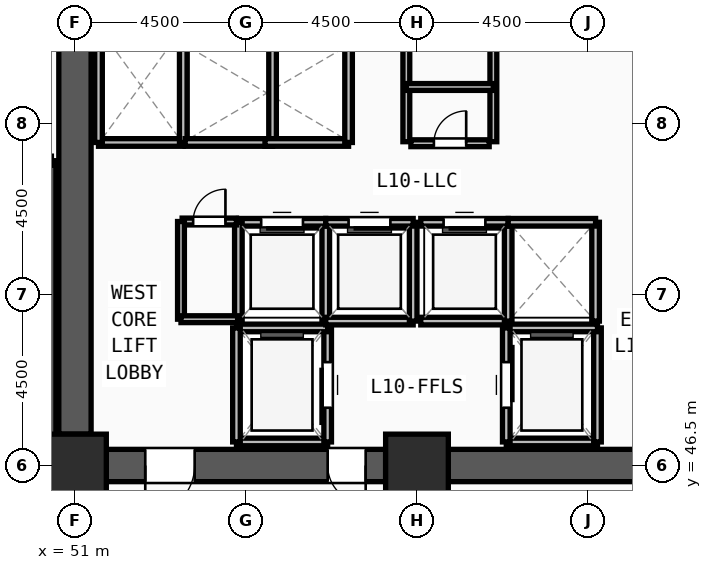
"""IFC4 building model, lengths in metres.
Left out: names, types, materials, properties, quantities, classifications, styles, units other than length and angle.
Written with IfcOpenShell. Run it as: python <this file> out.ifc"""

import sys

from ifc_helpers import new_model, si_unit, direction, frame, frame_2d, origin, origin_2d, place, context, subcontext, project, spatial, rectangle, extrude, source, transform, mapped, element, fill, save


model = new_model("IFC4")
c1 = context("Model", 3, precision=1e-05, world=origin(), true_north=direction((0.0, 1.0)))
c2 = subcontext(c1, "Body", "Model", "MODEL_VIEW")
j1 = project(units=[si_unit("LENGTHUNIT", "METRE"), si_unit("PLANEANGLEUNIT", "RADIAN")], contexts=[c1])
p1 = place(None, origin())
s1 = spatial("IfcSite", under=j1, at=p1, CompositionType="ELEMENT")
p2 = place(p1, origin())
s2 = spatial("IfcBuilding", under=s1, at=p2, CompositionType="ELEMENT")
p3 = place(p2, frame((0.0, 0.0, 39.75)))
s3 = spatial("IfcBuildingStorey", under=s2, at=p3, CompositionType="ELEMENT", Elevation=39.75)
m1 = source(origin(), c2, "Body", "SweptSolid", [
    extrude(rectangle(XDim=1.65, YDim=1.65, at=origin_2d()), origin(), (0.0, 0.0, 1.0), 3.75),
])
for number, where, z_axis, x_axis in (
    (1, (51.0, 46.5, 0.0), (0.0, 0.0, 1.0), (1.0, 0.0, 0.0)),
    (2, (60.0, 46.5, 0.0), (0.0, 0.0, 1.0), (1.0, 0.0, 0.0)),
):
    element("IfcColumn", number, at=place(p3, frame(where, z_axis=z_axis, x_axis=x_axis)), inside=s3, PredefinedType="COLUMN", context=c2, shape_type="MappedRepresentation", body=[
        mapped(m1, transform((0.0, 0.0, 0.0), x_axis=(1.0, 0.0, 0.0), y_axis=(0.0, 1.0, 0.0), z_axis=(0.0, 0.0, 1.0), scale=1.0)),
    ])
p4 = place(p3, frame((68.175, 46.5, 0.0), z_axis=(0.0, 0.0, 1.0), x_axis=(-1.0, 0.0, 0.0)))
e3 = element("IfcWall", 3, at=p4, inside=s3, PredefinedType="SHEAR", context=c2, shape_type="SweptSolid", body=[
    extrude(rectangle(XDim=7.35, YDim=0.85, at=frame_2d((3.675, 0.0))), origin(), (0.0, 0.0, 1.0), 3.57),
])
m2 = source(origin(), c2, "Body", "SweptSolid", [
    extrude(rectangle(XDim=1.3, YDim=2.2, at=frame_2d((0.65, 1.1))), frame((0.0, 0.435, 0.0), z_axis=(0.0, -1.0, 0.0), x_axis=(1.0, 0.0, 0.0)), (0.0, 0.0, 1.0), 0.87),
])
p5 = place(p4, frame((1.025, 0.0, 0.0)))
e4 = element("IfcOpeningElement", 4, at=p5, cuts=e3, PredefinedType="OPENING", context=c2, shape_type="MappedRepresentation", body=[
    mapped(m2, transform((0.0, 0.0, 0.0), x_axis=(1.0, 0.0, 0.0), y_axis=(0.0, 1.0, 0.0), z_axis=(0.0, 0.0, 1.0), scale=1.0)),
])
p6 = place(p3, frame((59.175, 46.5, 0.0), z_axis=(0.0, 0.0, 1.0), x_axis=(-1.0, 0.0, 0.0)))
e5 = element("IfcWall", 5, at=p6, inside=s3, PredefinedType="SHEAR", context=c2, shape_type="SweptSolid", body=[
    extrude(rectangle(XDim=7.35, YDim=0.85, at=frame_2d((3.675, 0.0))), origin(), (0.0, 0.0, 1.0), 3.57),
])
p7 = place(p6, frame((5.025, 0.0, 0.0)))
e6 = element("IfcOpeningElement", 6, at=p7, cuts=e5, PredefinedType="OPENING", context=c2, shape_type="MappedRepresentation", body=[
    mapped(m2, transform((0.0, 0.0, 0.0), x_axis=(1.0, 0.0, 0.0), y_axis=(0.0, 1.0, 0.0), z_axis=(0.0, 0.0, 1.0), scale=1.0)),
])
m3 = source(origin(), c2, "Body", "SweptSolid", [
    extrude(rectangle(XDim=1.0, YDim=2.2, at=frame_2d((0.5, 1.1))), frame((0.0, 0.435, 0.0), z_axis=(0.0, -1.0, 0.0), x_axis=(1.0, 0.0, 0.0)), (0.0, 0.0, 1.0), 0.87),
])
p8 = place(p6, frame((0.525, 0.0, 0.0)))
e7 = element("IfcOpeningElement", 7, at=p8, cuts=e5, PredefinedType="OPENING", context=c2, shape_type="MappedRepresentation", body=[
    mapped(m3, transform((0.0, 0.0, 0.0), x_axis=(1.0, 0.0, 0.0), y_axis=(0.0, 1.0, 0.0), z_axis=(0.0, 0.0, 1.0), scale=1.0)),
])
p9 = place(p3, frame((51.0, 47.325, 0.0), z_axis=(0.0, 0.0, 1.0), x_axis=(0.0, 1.0, 0.0)))
e8 = element("IfcWall", 8, at=p9, inside=s3, PredefinedType="SHEAR", context=c2, shape_type="SweptSolid", body=[
    extrude(rectangle(XDim=13.35, YDim=0.85, at=frame_2d((6.675, 0.0))), origin(), (0.0, 0.0, 1.0), 3.57),
])
p10 = place(p3, frame((50.38, 46.7, 0.0), z_axis=(0.0, 0.0, 1.0), x_axis=(0.0, 1.0, 0.0)))
e9 = element("IfcWall", 9, at=p10, inside=s3, PredefinedType="SOLIDWALL", context=c2, shape_type="SweptSolid", body=[
    extrude(rectangle(XDim=7.82, YDim=0.24, at=frame_2d((3.91, 0.0))), origin(), (0.0, 0.0, 1.0), 3.57),
])
p11 = place(p3, frame((55.25, 47.12, 0.0), z_axis=(0.0, 0.0, 1.0), x_axis=(1.0, 0.0, 0.0)))
e10 = element("IfcWall", 10, at=p11, inside=s3, PredefinedType="SOLIDWALL", context=c2, shape_type="SweptSolid", body=[
    extrude(rectangle(XDim=2.4, YDim=0.2, at=frame_2d((1.2, 0.0))), origin(), (0.0, 0.0, 1.0), 3.57),
])
p12 = place(p3, frame((57.65, 47.12, 0.0), z_axis=(0.0, 0.0, 1.0), x_axis=(0.0, 1.0, 0.0)))
e11 = element("IfcWall", 11, at=p12, inside=s3, PredefinedType="SOLIDWALL", context=c2, shape_type="SweptSolid", body=[
    extrude(rectangle(XDim=3.0, YDim=0.2, at=frame_2d((1.5, 0.0))), origin(), (0.0, 0.0, 1.0), 3.57),
])
m4 = source(origin(), c2, "Body", "SweptSolid", [
    extrude(rectangle(XDim=1.2, YDim=2.3, at=frame_2d((0.6, 1.15))), frame((0.0, 0.11, 0.0), z_axis=(0.0, -1.0, 0.0), x_axis=(1.0, 0.0, 0.0)), (0.0, 0.0, 1.0), 0.22),
])
p13 = place(p12, frame((0.9, 0.0, 0.0)))
e12 = element("IfcOpeningElement", 12, at=p13, cuts=e11, PredefinedType="OPENING", context=c2, shape_type="MappedRepresentation", body=[
    mapped(m4, transform((0.0, 0.0, 0.0), x_axis=(1.0, 0.0, 0.0), y_axis=(0.0, 1.0, 0.0), z_axis=(0.0, 0.0, 1.0), scale=1.0)),
])
p14 = place(p3, frame((57.65, 50.12, 0.0), z_axis=(0.0, 0.0, 1.0), x_axis=(-1.0, 0.0, 0.0)))
e13 = element("IfcWall", 13, at=p14, inside=s3, PredefinedType="SOLIDWALL", context=c2, shape_type="SweptSolid", body=[
    extrude(rectangle(XDim=2.4, YDim=0.2, at=frame_2d((1.2, 0.0))), origin(), (0.0, 0.0, 1.0), 3.57),
])
p15 = place(p3, frame((55.25, 50.12, 0.0), z_axis=(0.0, 0.0, 1.0), x_axis=(0.0, -1.0, 0.0)))
e14 = element("IfcWall", 14, at=p15, inside=s3, PredefinedType="SOLIDWALL", context=c2, shape_type="SweptSolid", body=[
    extrude(rectangle(XDim=3.0, YDim=0.2, at=frame_2d((1.5, 0.0))), origin(), (0.0, 0.0, 1.0), 3.57),
])
p16 = place(p3, frame((62.35, 47.12, 0.0), z_axis=(0.0, 0.0, 1.0), x_axis=(1.0, 0.0, 0.0)))
e15 = element("IfcWall", 15, at=p16, inside=s3, PredefinedType="SOLIDWALL", context=c2, shape_type="SweptSolid", body=[
    extrude(rectangle(XDim=2.4, YDim=0.2, at=frame_2d((1.2, 0.0))), origin(), (0.0, 0.0, 1.0), 3.57),
])
p17 = place(p3, frame((64.75, 47.12, 0.0), z_axis=(0.0, 0.0, 1.0), x_axis=(0.0, 1.0, 0.0)))
e16 = element("IfcWall", 16, at=p17, inside=s3, PredefinedType="SOLIDWALL", context=c2, shape_type="SweptSolid", body=[
    extrude(rectangle(XDim=3.0, YDim=0.2, at=frame_2d((1.5, 0.0))), origin(), (0.0, 0.0, 1.0), 3.57),
])
p18 = place(p3, frame((64.75, 50.12, 0.0), z_axis=(0.0, 0.0, 1.0), x_axis=(-1.0, 0.0, 0.0)))
e17 = element("IfcWall", 17, at=p18, inside=s3, PredefinedType="SOLIDWALL", context=c2, shape_type="SweptSolid", body=[
    extrude(rectangle(XDim=2.4, YDim=0.2, at=frame_2d((1.2, 0.0))), origin(), (0.0, 0.0, 1.0), 3.57),
])
p19 = place(p3, frame((62.35, 50.12, 0.0), z_axis=(0.0, 0.0, 1.0), x_axis=(0.0, -1.0, 0.0)))
e18 = element("IfcWall", 18, at=p19, inside=s3, PredefinedType="SOLIDWALL", context=c2, shape_type="SweptSolid", body=[
    extrude(rectangle(XDim=3.0, YDim=0.2, at=frame_2d((1.5, 0.0))), origin(), (0.0, 0.0, 1.0), 3.57),
])
p20 = place(p19, frame((0.9, 0.0, 0.0)))
e19 = element("IfcOpeningElement", 19, at=p20, cuts=e18, PredefinedType="OPENING", context=c2, shape_type="MappedRepresentation", body=[
    mapped(m4, transform((0.0, 0.0, 0.0), x_axis=(1.0, 0.0, 0.0), y_axis=(0.0, 1.0, 0.0), z_axis=(0.0, 0.0, 1.0), scale=1.0)),
])
p21 = place(p3, frame((51.62, 55.0, 0.0), z_axis=(0.0, 0.0, 1.0), x_axis=(1.0, 0.0, 0.0)))
e20 = element("IfcWall", 20, at=p21, inside=s3, PredefinedType="SOLIDWALL", context=c2, shape_type="SweptSolid", body=[
    extrude(rectangle(XDim=2.23, YDim=0.2, at=frame_2d((1.115, 0.0))), origin(), (0.0, 0.0, 1.0), 3.57),
])
for number, where, z_axis, x_axis in (
    (21, (53.85, 55.0, 0.0), (0.0, 0.0, 1.0), (0.0, 1.0, 0.0)),
    (22, (51.62, 58.0, 0.0), (0.0, 0.0, 1.0), (0.0, -1.0, 0.0)),
):
    element("IfcWall", number, at=place(p3, frame(where, z_axis=z_axis, x_axis=x_axis)), inside=s3, PredefinedType="SOLIDWALL", context=c2, shape_type="SweptSolid", body=[
        extrude(rectangle(XDim=3.0, YDim=0.2, at=frame_2d((1.5, 0.0))), origin(), (0.0, 0.0, 1.0), 3.57),
    ])
p22 = place(p3, frame((57.6, 50.3, 0.0), z_axis=(0.0, 0.0, 1.0), x_axis=(0.0, 1.0, 0.0)))
e23 = element("IfcWall", 23, at=p22, inside=s3, PredefinedType="SOLIDWALL", context=c2, shape_type="SweptSolid", body=[
    extrude(rectangle(XDim=2.6, YDim=0.2, at=frame_2d((1.3, 0.0))), origin(), (0.0, 0.0, 1.0), 3.57),
])
p23 = place(p3, frame((57.6, 52.9, 0.0), z_axis=(0.0, 0.0, 1.0), x_axis=(-1.0, 0.0, 0.0)))
e24 = element("IfcWall", 24, at=p23, inside=s3, PredefinedType="SOLIDWALL", context=c2, shape_type="SweptSolid", body=[
    extrude(rectangle(XDim=2.3, YDim=0.2, at=frame_2d((1.15, 0.0))), origin(), (0.0, 0.0, 1.0), 3.57),
])
m5 = source(origin(), c2, "Body", "SweptSolid", [
    extrude(rectangle(XDim=1.1, YDim=2.2, at=frame_2d((0.55, 1.1))), frame((0.0, 0.11, 0.0), z_axis=(0.0, -1.0, 0.0), x_axis=(1.0, 0.0, 0.0)), (0.0, 0.0, 1.0), 0.22),
])
p24 = place(p23, frame((0.6, 0.0, 0.0)))
e25 = element("IfcOpeningElement", 25, at=p24, cuts=e24, PredefinedType="OPENING", context=c2, shape_type="MappedRepresentation", body=[
    mapped(m5, transform((0.0, 0.0, 0.0), x_axis=(1.0, 0.0, 0.0), y_axis=(0.0, 1.0, 0.0), z_axis=(0.0, 0.0, 1.0), scale=1.0)),
])
p25 = place(p3, frame((55.3, 52.9, 0.0), z_axis=(0.0, 0.0, 1.0), x_axis=(0.0, -1.0, 0.0)))
e26 = element("IfcWall", 26, at=p25, inside=s3, PredefinedType="SOLIDWALL", context=c2, shape_type="SweptSolid", body=[
    extrude(rectangle(XDim=2.6, YDim=0.2, at=frame_2d((1.3, 0.0))), origin(), (0.0, 0.0, 1.0), 3.57),
])
p26 = place(p3, frame((57.6, 50.3, 0.0), z_axis=(0.0, 0.0, 1.0), x_axis=(1.0, 0.0, 0.0)))
e27 = element("IfcWall", 27, at=p26, inside=s3, PredefinedType="SOLIDWALL", context=c2, shape_type="SweptSolid", body=[
    extrude(rectangle(XDim=2.3, YDim=0.2, at=frame_2d((1.15, 0.0))), origin(), (0.0, 0.0, 1.0), 3.57),
])
p27 = place(p3, frame((59.9, 50.3, 0.0), z_axis=(0.0, 0.0, 1.0), x_axis=(0.0, 1.0, 0.0)))
e28 = element("IfcWall", 28, at=p27, inside=s3, PredefinedType="SOLIDWALL", context=c2, shape_type="SweptSolid", body=[
    extrude(rectangle(XDim=2.6, YDim=0.2, at=frame_2d((1.3, 0.0))), origin(), (0.0, 0.0, 1.0), 3.57),
])
p28 = place(p3, frame((59.9, 52.9, 0.0), z_axis=(0.0, 0.0, 1.0), x_axis=(-1.0, 0.0, 0.0)))
e29 = element("IfcWall", 29, at=p28, inside=s3, PredefinedType="SOLIDWALL", context=c2, shape_type="SweptSolid", body=[
    extrude(rectangle(XDim=2.3, YDim=0.2, at=frame_2d((1.15, 0.0))), origin(), (0.0, 0.0, 1.0), 3.57),
])
p29 = place(p28, frame((0.6, 0.0, 0.0)))
e30 = element("IfcOpeningElement", 30, at=p29, cuts=e29, PredefinedType="OPENING", context=c2, shape_type="MappedRepresentation", body=[
    mapped(m5, transform((0.0, 0.0, 0.0), x_axis=(1.0, 0.0, 0.0), y_axis=(0.0, 1.0, 0.0), z_axis=(0.0, 0.0, 1.0), scale=1.0)),
])
p30 = place(p3, frame((60.1, 50.3, 0.0), z_axis=(0.0, 0.0, 1.0), x_axis=(1.0, 0.0, 0.0)))
e31 = element("IfcWall", 31, at=p30, inside=s3, PredefinedType="SOLIDWALL", context=c2, shape_type="SweptSolid", body=[
    extrude(rectangle(XDim=2.3, YDim=0.2, at=frame_2d((1.15, 0.0))), origin(), (0.0, 0.0, 1.0), 3.57),
])
p31 = place(p3, frame((62.4, 50.3, 0.0), z_axis=(0.0, 0.0, 1.0), x_axis=(0.0, 1.0, 0.0)))
e32 = element("IfcWall", 32, at=p31, inside=s3, PredefinedType="SOLIDWALL", context=c2, shape_type="SweptSolid", body=[
    extrude(rectangle(XDim=2.6, YDim=0.2, at=frame_2d((1.3, 0.0))), origin(), (0.0, 0.0, 1.0), 3.57),
])
p32 = place(p3, frame((62.4, 52.9, 0.0), z_axis=(0.0, 0.0, 1.0), x_axis=(-1.0, 0.0, 0.0)))
e33 = element("IfcWall", 33, at=p32, inside=s3, PredefinedType="SOLIDWALL", context=c2, shape_type="SweptSolid", body=[
    extrude(rectangle(XDim=2.3, YDim=0.2, at=frame_2d((1.15, 0.0))), origin(), (0.0, 0.0, 1.0), 3.57),
])
p33 = place(p32, frame((0.6, 0.0, 0.0)))
e34 = element("IfcOpeningElement", 34, at=p33, cuts=e33, PredefinedType="OPENING", context=c2, shape_type="MappedRepresentation", body=[
    mapped(m5, transform((0.0, 0.0, 0.0), x_axis=(1.0, 0.0, 0.0), y_axis=(0.0, 1.0, 0.0), z_axis=(0.0, 0.0, 1.0), scale=1.0)),
])
p34 = place(p3, frame((64.7, 50.3, 0.0), z_axis=(0.0, 0.0, 1.0), x_axis=(0.0, 1.0, 0.0)))
e35 = element("IfcWall", 35, at=p34, inside=s3, PredefinedType="SOLIDWALL", context=c2, shape_type="SweptSolid", body=[
    extrude(rectangle(XDim=2.6, YDim=0.2, at=frame_2d((1.3, 0.0))), origin(), (0.0, 0.0, 1.0), 3.57),
])
for number, where, z_axis, x_axis in (
    (36, (64.7, 52.9, 0.0), (0.0, 0.0, 1.0), (-1.0, 0.0, 0.0)),
    (37, (53.9, 55.0, 0.0), (0.0, 0.0, 1.0), (1.0, 0.0, 0.0)),
):
    element("IfcWall", number, at=place(p3, frame(where, z_axis=z_axis, x_axis=x_axis)), inside=s3, PredefinedType="SOLIDWALL", context=c2, shape_type="SweptSolid", body=[
        extrude(rectangle(XDim=2.3, YDim=0.2, at=frame_2d((1.15, 0.0))), origin(), (0.0, 0.0, 1.0), 3.57),
    ])
p35 = place(p3, frame((56.2, 55.0, 0.0), z_axis=(0.0, 0.0, 1.0), x_axis=(0.0, 1.0, 0.0)))
e38 = element("IfcWall", 38, at=p35, inside=s3, PredefinedType="SOLIDWALL", context=c2, shape_type="SweptSolid", body=[
    extrude(rectangle(XDim=2.6, YDim=0.2, at=frame_2d((1.3, 0.0))), origin(), (0.0, 0.0, 1.0), 3.57),
])
p36 = place(p3, frame((56.0, 55.0, 0.0), z_axis=(0.0, 0.0, 1.0), x_axis=(1.0, 0.0, 0.0)))
e39 = element("IfcWall", 39, at=p36, inside=s3, PredefinedType="SOLIDWALL", context=c2, shape_type="SweptSolid", body=[
    extrude(rectangle(XDim=2.2, YDim=0.2, at=frame_2d((1.1, 0.0))), origin(), (0.0, 0.0, 1.0), 3.57),
])
p37 = place(p3, frame((58.2, 55.0, 0.0), z_axis=(0.0, 0.0, 1.0), x_axis=(0.0, 1.0, 0.0)))
e40 = element("IfcWall", 40, at=p37, inside=s3, PredefinedType="SOLIDWALL", context=c2, shape_type="SweptSolid", body=[
    extrude(rectangle(XDim=2.6, YDim=0.2, at=frame_2d((1.3, 0.0))), origin(), (0.0, 0.0, 1.0), 3.57),
])
p38 = place(p3, frame((59.84, 54.98, 0.0), z_axis=(0.0, 0.0, 1.0), x_axis=(1.0, 0.0, 0.0)))
e41 = element("IfcWall", 41, at=p38, inside=s3, PredefinedType="PARTITIONING", context=c2, shape_type="SweptSolid", body=[
    extrude(rectangle(XDim=2.06, YDim=0.18, at=frame_2d((1.03, 0.0))), origin(), (0.0, 0.0, 1.0), 3.57),
])
m6 = source(origin(), c2, "Body", "SweptSolid", [
    extrude(rectangle(XDim=0.85, YDim=2.1, at=frame_2d((0.425, 1.05))), frame((0.0, 0.1, 0.0), z_axis=(0.0, -1.0, 0.0), x_axis=(1.0, 0.0, 0.0)), (0.0, 0.0, 1.0), 0.2),
])
p39 = place(p38, frame((0.605, 0.0, 0.0)))
e42 = element("IfcOpeningElement", 42, at=p39, cuts=e41, PredefinedType="OPENING", context=c2, shape_type="MappedRepresentation", body=[
    mapped(m6, transform((0.0, 0.0, 0.0), x_axis=(1.0, 0.0, 0.0), y_axis=(0.0, 1.0, 0.0), z_axis=(0.0, 0.0, 1.0), scale=1.0)),
])
p40 = place(p3, frame((53.82, 52.92, 0.0), z_axis=(0.0, 0.0, 1.0), x_axis=(1.0, 0.0, 0.0)))
e43 = element("IfcWall", 43, at=p40, inside=s3, PredefinedType="PARTITIONING", context=c2, shape_type="SweptSolid", body=[
    extrude(rectangle(XDim=1.43, YDim=0.18, at=frame_2d((0.715, 0.0))), origin(), (0.0, 0.0, 1.0), 3.57),
])
p41 = place(p40, frame((0.29, 0.0, 0.0)))
e44 = element("IfcOpeningElement", 44, at=p41, cuts=e43, PredefinedType="OPENING", context=c2, shape_type="MappedRepresentation", body=[
    mapped(m6, transform((0.0, 0.0, 0.0), x_axis=(1.0, 0.0, 0.0), y_axis=(0.0, 1.0, 0.0), z_axis=(0.0, 0.0, 1.0), scale=1.0)),
])
for number, where, z_axis, x_axis in (
    (45, (59.72, 55.02, 0.0), (0.0, 0.0, 1.0), (0.0, 1.0, 0.0)),
    (46, (62.01, 55.02, 0.0), (0.0, 0.0, 1.0), (0.0, 1.0, 0.0)),
):
    element("IfcWall", number, at=place(p3, frame(where, z_axis=z_axis, x_axis=x_axis)), inside=s3, PredefinedType="PARTITIONING", context=c2, shape_type="SweptSolid", body=[
        extrude(rectangle(XDim=2.88, YDim=0.18, at=frame_2d((1.44, 0.0))), origin(), (0.0, 0.0, 1.0), 3.57),
    ])
p42 = place(p3, frame((59.72, 56.46, 0.0), z_axis=(0.0, 0.0, 1.0), x_axis=(1.0, 0.0, 0.0)))
e47 = element("IfcWall", 47, at=p42, inside=s3, PredefinedType="PARTITIONING", context=c2, shape_type="SweptSolid", body=[
    extrude(rectangle(XDim=2.29, YDim=0.18, at=frame_2d((1.145, 0.0))), origin(), (0.0, 0.0, 1.0), 3.57),
])
p43 = place(p3, frame((53.79, 50.35, 0.0), z_axis=(0.0, 0.0, 1.0), x_axis=(0.0, 1.0, 0.0)))
e48 = element("IfcWall", 48, at=p43, inside=s3, PredefinedType="PARTITIONING", context=c2, shape_type="SweptSolid", body=[
    extrude(rectangle(XDim=2.57, YDim=0.18, at=frame_2d((1.285, 0.0))), origin(), (0.0, 0.0, 1.0), 3.57),
])
p44 = place(p3, frame((53.79, 50.35, 0.0), z_axis=(0.0, 0.0, 1.0), x_axis=(1.0, 0.0, 0.0)))
e49 = element("IfcWall", 49, at=p44, inside=s3, PredefinedType="PARTITIONING", context=c2, shape_type="SweptSolid", body=[
    extrude(rectangle(XDim=1.49, YDim=0.18, at=frame_2d((0.745, 0.0))), origin(), (0.0, 0.0, 1.0), 3.57),
])
m7 = source(origin(), c2, "Body", "SweptSolid", [
    extrude(rectangle(XDim=1.3, YDim=2.2, at=frame_2d((0.65, 1.1))), frame((0.0, 0.025, 0.0), z_axis=(0.0, -1.0, 0.0), x_axis=(1.0, 0.0, 0.0)), (0.0, 0.0, 1.0), 0.05),
])
p45 = place(p7, origin())
e50 = element("IfcDoor", 50, at=p45, inside=s3, OperationType="SINGLE_SWING_RIGHT", PredefinedType="DOOR", context=c2, shape_type="MappedRepresentation", body=[
    mapped(m7, transform((0.0, 0.0, 0.0), x_axis=(1.0, 0.0, 0.0), y_axis=(0.0, 1.0, 0.0), z_axis=(0.0, 0.0, 1.0), scale=1.0)),
])
fill(e6, e50)
m8 = source(origin(), c2, "Body", "SweptSolid", [
    extrude(rectangle(XDim=1.0, YDim=2.2, at=frame_2d((0.5, 1.1))), frame((0.0, 0.025, 0.0), z_axis=(0.0, -1.0, 0.0), x_axis=(1.0, 0.0, 0.0)), (0.0, 0.0, 1.0), 0.05),
])
p46 = place(p8, origin())
e51 = element("IfcDoor", 51, at=p46, inside=s3, OperationType="SINGLE_SWING_LEFT", PredefinedType="DOOR", context=c2, shape_type="MappedRepresentation", body=[
    mapped(m8, transform((0.0, 0.0, 0.0), x_axis=(1.0, 0.0, 0.0), y_axis=(0.0, 1.0, 0.0), z_axis=(0.0, 0.0, 1.0), scale=1.0)),
])
fill(e7, e51)
m9 = source(origin(), c2, "Body", "SweptSolid", [
    extrude(rectangle(XDim=1.2, YDim=2.3, at=frame_2d((0.6, 1.15))), frame((0.0, 0.025, 0.0), z_axis=(0.0, -1.0, 0.0), x_axis=(1.0, 0.0, 0.0)), (0.0, 0.0, 1.0), 0.05),
])
p47 = place(p13, origin())
e52 = element("IfcDoor", 52, at=p47, inside=s3, OperationType="SLIDING_TO_LEFT", PredefinedType="DOOR", context=c2, shape_type="MappedRepresentation", body=[
    mapped(m9, transform((0.0, 0.0, 0.0), x_axis=(1.0, 0.0, 0.0), y_axis=(0.0, 1.0, 0.0), z_axis=(0.0, 0.0, 1.0), scale=1.0)),
])
fill(e12, e52)
p48 = place(p20, origin())
e53 = element("IfcDoor", 53, at=p48, inside=s3, OperationType="SLIDING_TO_LEFT", PredefinedType="DOOR", context=c2, shape_type="MappedRepresentation", body=[
    mapped(m9, transform((0.0, 0.0, 0.0), x_axis=(1.0, 0.0, 0.0), y_axis=(0.0, 1.0, 0.0), z_axis=(0.0, 0.0, 1.0), scale=1.0)),
])
fill(e19, e53)
m10 = source(origin(), c2, "Body", "SweptSolid", [
    extrude(rectangle(XDim=1.1, YDim=2.2, at=frame_2d((0.55, 1.1))), frame((0.0, 0.025, 0.0), z_axis=(0.0, -1.0, 0.0), x_axis=(1.0, 0.0, 0.0)), (0.0, 0.0, 1.0), 0.05),
])
p49 = place(p24, origin())
e54 = element("IfcDoor", 54, at=p49, inside=s3, OperationType="SLIDING_TO_LEFT", PredefinedType="DOOR", context=c2, shape_type="MappedRepresentation", body=[
    mapped(m10, transform((0.0, 0.0, 0.0), x_axis=(1.0, 0.0, 0.0), y_axis=(0.0, 1.0, 0.0), z_axis=(0.0, 0.0, 1.0), scale=1.0)),
])
fill(e25, e54)
p50 = place(p29, origin())
e55 = element("IfcDoor", 55, at=p50, inside=s3, OperationType="SLIDING_TO_LEFT", PredefinedType="DOOR", context=c2, shape_type="MappedRepresentation", body=[
    mapped(m10, transform((0.0, 0.0, 0.0), x_axis=(1.0, 0.0, 0.0), y_axis=(0.0, 1.0, 0.0), z_axis=(0.0, 0.0, 1.0), scale=1.0)),
])
fill(e30, e55)
p51 = place(p33, origin())
e56 = element("IfcDoor", 56, at=p51, inside=s3, OperationType="SLIDING_TO_LEFT", PredefinedType="DOOR", context=c2, shape_type="MappedRepresentation", body=[
    mapped(m10, transform((0.0, 0.0, 0.0), x_axis=(1.0, 0.0, 0.0), y_axis=(0.0, 1.0, 0.0), z_axis=(0.0, 0.0, 1.0), scale=1.0)),
])
fill(e34, e56)
m11 = source(origin(), c2, "Body", "SweptSolid", [
    extrude(rectangle(XDim=0.85, YDim=2.1, at=frame_2d((0.425, 1.05))), frame((0.0, 0.025, 0.0), z_axis=(0.0, -1.0, 0.0), x_axis=(1.0, 0.0, 0.0)), (0.0, 0.0, 1.0), 0.05),
])
p52 = place(p39, origin())
e57 = element("IfcDoor", 57, at=p52, inside=s3, OperationType="SINGLE_SWING_RIGHT", PredefinedType="DOOR", context=c2, shape_type="MappedRepresentation", body=[
    mapped(m11, transform((0.0, 0.0, 0.0), x_axis=(1.0, 0.0, 0.0), y_axis=(0.0, 1.0, 0.0), z_axis=(0.0, 0.0, 1.0), scale=1.0)),
])
fill(e42, e57)
p53 = place(p41, origin())
e58 = element("IfcDoor", 58, at=p53, inside=s3, OperationType="SINGLE_SWING_RIGHT", PredefinedType="DOOR", context=c2, shape_type="MappedRepresentation", body=[
    mapped(m11, transform((0.0, 0.0, 0.0), x_axis=(1.0, 0.0, 0.0), y_axis=(0.0, 1.0, 0.0), z_axis=(0.0, 0.0, 1.0), scale=1.0)),
])
fill(e44, e58)
save(model, sys.argv[1])
